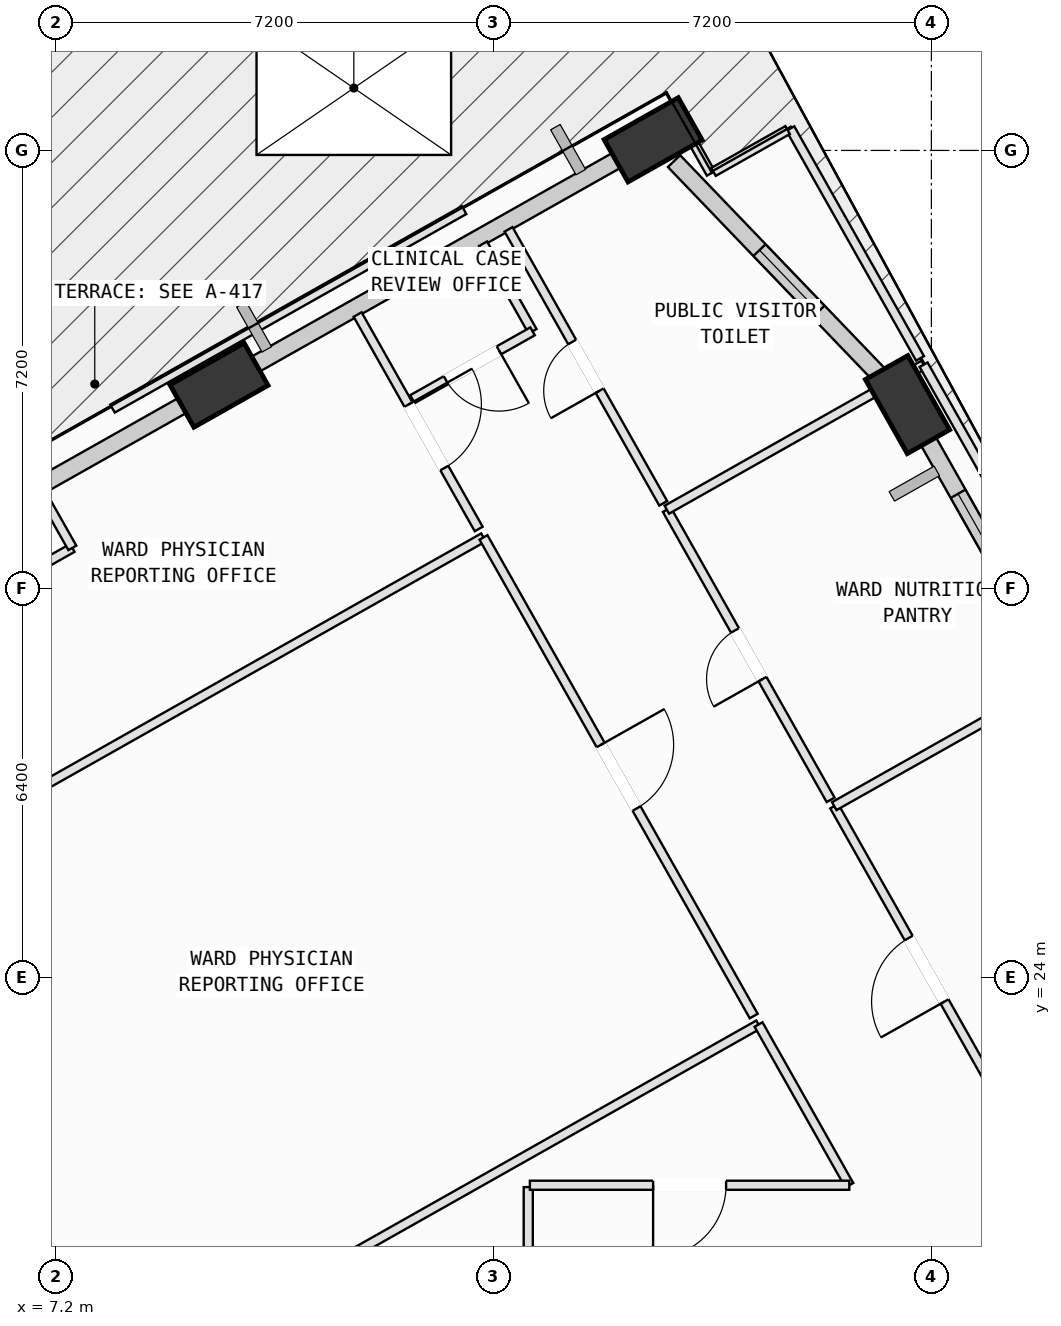
"""IFC4 building model, lengths in metres.
Left out: names, types, materials, properties, quantities, classifications, styles, units other than length and angle.
Written with IfcOpenShell. Run it as: python <this file> out.ifc"""

import sys

from ifc_helpers import new_model, si_unit, direction, frame, frame_2d, origin, origin_2d, place, context, subcontext, project, spatial, rectangle, extrude, element, fill, save


model = new_model("IFC4")
c1 = context("Model", 3, precision=1e-05, world=origin(), true_north=direction((0.0, 1.0)))
c2 = subcontext(c1, "Body", "Model", "MODEL_VIEW")
j1 = project(units=[si_unit("LENGTHUNIT", "METRE"), si_unit("PLANEANGLEUNIT", "RADIAN")], contexts=[c1])
p1 = place(None, origin())
s1 = spatial("IfcSite", under=j1, at=p1, CompositionType="ELEMENT")
p2 = place(p1, origin())
s2 = spatial("IfcBuilding", under=s1, at=p2, CompositionType="ELEMENT")
p3 = place(p2, frame((0.0, 0.0, 149.8)))
s3 = spatial("IfcBuildingStorey", under=s2, at=p3, CompositionType="ELEMENT", Elevation=149.8)
p4 = place(p3, frame((21.208, 33.419, 0.053), z_axis=(-0.035203563334, -0.051508371615, 0.998051900846), x_axis=(0.084473299342, 0.994943607494, 0.054327521614)))
e1 = element("IfcColumn", 1, at=p4, inside=s3, PredefinedType="COLUMN", context=c2, shape_type="SweptSolid", body=[
    extrude(rectangle(XDim=1.4, YDim=0.8, at=origin_2d()), origin(), (0.0, 0.0, 1.0), 3.953),
])
p5 = place(p3, frame((17.024, 37.775, 0.063), z_axis=(-0.053027503477, -0.068911033073, 0.996212504135), x_axis=(0.988817744934, -0.14286989529, 0.04275114411)))
e2 = element("IfcColumn", 2, at=p5, inside=s3, PredefinedType="COLUMN", context=c2, shape_type="SweptSolid", body=[
    extrude(rectangle(XDim=1.4, YDim=0.8, at=origin_2d()), origin(), (0.0, 0.0, 1.0), 3.95),
])
p6 = place(p3, frame((9.884, 33.74, 0.075), z_axis=(-0.036080308129, -0.098029516425, 0.994529248074), x_axis=(0.986085311724, 0.15810776909, 0.051358459426)))
e3 = element("IfcColumn", 3, at=p6, inside=s3, PredefinedType="COLUMN", context=c2, shape_type="SweptSolid", body=[
    extrude(rectangle(XDim=1.4, YDim=0.8, at=origin_2d()), origin(), (0.0, 0.0, 1.0), 3.945),
])
p7 = place(p3, frame((24.534, 27.535, 0.0), z_axis=(0.0, 0.0, 1.0), x_axis=(-0.491640915593, 0.870798030611, 0.0)))
e4 = element("IfcWall", 4, at=p7, inside=s3, PredefinedType="SOLIDWALL", context=c2, shape_type="SweptSolid", body=[
    extrude(rectangle(XDim=6.223, YDim=0.28, at=frame_2d((3.111, 0.0))), origin(), (0.0, 0.0, 1.0), 3.165),
])
p8 = place(p7, frame((3.074, 0.0, 0.75)))
e5 = element("IfcOpeningElement", 5, at=p8, cuts=e4, PredefinedType="OPENING", context=c2, shape_type="SweptSolid", body=[
    extrude(rectangle(XDim=2.0, YDim=1.95, at=frame_2d((1.0, 0.975))), frame((0.0, 0.15, 0.0), z_axis=(0.0, -1.0, 0.0), x_axis=(1.0, 0.0, 0.0)), (0.0, 0.0, 1.0), 0.3),
])
p9 = place(p3, frame((17.368, 37.425, 0.0), z_axis=(0.0, 0.0, 1.0), x_axis=(0.692504883459, -0.721413187005, 0.0)))
e6 = element("IfcWall", 6, at=p9, inside=s3, PredefinedType="SOLIDWALL", context=c2, shape_type="SweptSolid", body=[
    extrude(rectangle(XDim=5.093, YDim=0.28, at=frame_2d((2.546, 0.0))), origin(), (0.0, 0.0, 1.0), 3.165),
])
p10 = place(p9, frame((2.03, 0.0, 0.75)))
e7 = element("IfcOpeningElement", 7, at=p10, cuts=e6, PredefinedType="OPENING", context=c2, shape_type="SweptSolid", body=[
    extrude(rectangle(XDim=1.4, YDim=1.85, at=frame_2d((0.7, 0.925))), frame((0.0, 0.15, 0.0), z_axis=(0.0, -1.0, 0.0), x_axis=(1.0, 0.0, 0.0)), (0.0, 0.0, 1.0), 0.3),
])
p11 = place(p3, frame((10.163, 33.903, 0.0), z_axis=(0.0, 0.0, 1.0), x_axis=(0.87077907775, 0.491674483528, 0.0)))
e8 = element("IfcWall", 8, at=p11, inside=s3, PredefinedType="SOLIDWALL", context=c2, shape_type="SweptSolid", body=[
    extrude(rectangle(XDim=7.231, YDim=0.28, at=frame_2d((3.615, 0.0))), origin(), (0.0, 0.0, 1.0), 3.165),
])
p12 = place(p3, frame((3.001, 29.86, 0.0), z_axis=(0.0, 0.0, 1.0), x_axis=(0.87078604554, 0.491662143033, 0.0)))
e9 = element("IfcWall", 9, at=p12, inside=s3, PredefinedType="SOLIDWALL", context=c2, shape_type="SweptSolid", body=[
    extrude(rectangle(XDim=7.27, YDim=0.28, at=frame_2d((3.635, 0.0))), origin(), (0.0, 0.0, 1.0), 3.165),
])
p13 = place(p12, frame((3.085, 0.0, 0.0)))
e10 = element("IfcOpeningElement", 10, at=p13, cuts=e9, PredefinedType="OPENING", context=c2, shape_type="SweptSolid", body=[
    extrude(rectangle(XDim=1.1, YDim=2.15, at=frame_2d((0.55, 1.075))), frame((0.0, 0.15, 0.0), z_axis=(0.0, -1.0, 0.0), x_axis=(1.0, 0.0, 0.0)), (0.0, 0.0, 1.0), 0.3),
])
p14 = place(p3, frame((14.97, 20.55, 0.0), z_axis=(0.0, 0.0, 1.0), x_axis=(0.0, -1.0, 0.0)))
e11 = element("IfcWall", 11, at=p14, inside=s3, PredefinedType="PARTITIONING", context=c2, shape_type="SweptSolid", body=[
    extrude(rectangle(XDim=2.32, YDim=0.15, at=frame_2d((1.16, 0.0))), origin(), (0.0, 0.0, 1.0), 2.765),
])
p15 = place(p3, frame((6.884, 16.519, 0.0), z_axis=(0.0, 0.0, 1.0), x_axis=(0.870744187076, 0.491736271464, 0.0)))
e12 = element("IfcWall", 12, at=p15, inside=s3, PredefinedType="PARTITIONING", context=c2, shape_type="SweptSolid", body=[
    extrude(rectangle(XDim=13.635, YDim=0.15, at=frame_2d((6.818, 0.0))), origin(), (0.0, 0.0, 1.0), 3.78),
])
p16 = place(p3, frame((18.757, 23.224, 0.0), z_axis=(0.0, 0.0, 1.0), x_axis=(0.491673041497, -0.870779891973, 0.0)))
e13 = element("IfcWall", 13, at=p16, inside=s3, PredefinedType="PARTITIONING", context=c2, shape_type="SweptSolid", body=[
    extrude(rectangle(XDim=3.036, YDim=0.15, at=frame_2d((1.518, 0.0))), origin(), (0.0, 0.0, 1.0), 3.78),
])
p17 = place(p3, frame((20.25, 20.58, 0.0), z_axis=(0.0, 0.0, 1.0), x_axis=(-1.0, 0.0, 0.0)))
e14 = element("IfcWall", 14, at=p17, inside=s3, PredefinedType="PARTITIONING", context=c2, shape_type="SweptSolid", body=[
    extrude(rectangle(XDim=5.253, YDim=0.15, at=frame_2d((2.626, 0.0))), origin(), (0.0, 0.0, 1.0), 3.78),
])
p18 = place(p17, frame((2.027, 0.0, 0.0)))
e15 = element("IfcOpeningElement", 15, at=p18, cuts=e14, PredefinedType="OPENING", context=c2, shape_type="SweptSolid", body=[
    extrude(rectangle(XDim=1.2, YDim=2.15, at=frame_2d((0.6, 1.075))), frame((0.0, 0.085, 0.0), z_axis=(0.0, -1.0, 0.0), x_axis=(1.0, 0.0, 0.0)), (0.0, 0.0, 1.0), 0.17),
])
p19 = place(p3, frame((2.06, 24.361, 0.0), z_axis=(0.0, 0.0, 1.0), x_axis=(0.870772215096, 0.491686637419, 0.0)))
e16 = element("IfcWall", 16, at=p19, inside=s3, PredefinedType="PARTITIONING", context=c2, shape_type="SweptSolid", body=[
    extrude(rectangle(XDim=13.98, YDim=0.15, at=frame_2d((6.99, 0.0))), origin(), (0.0, 0.0, 1.0), 3.78),
])
p20 = place(p3, frame((14.234, 31.235, 0.0), z_axis=(0.0, 0.0, 1.0), x_axis=(0.491609563099, -0.870815731065, 0.0)))
e17 = element("IfcWall", 17, at=p20, inside=s3, PredefinedType="PARTITIONING", context=c2, shape_type="SweptSolid", body=[
    extrude(rectangle(XDim=9.04, YDim=0.15, at=frame_2d((4.52, 0.0))), origin(), (0.0, 0.0, 1.0), 3.78),
])
p21 = place(p20, frame((3.92, 0.0, 0.0)))
e18 = element("IfcOpeningElement", 18, at=p21, cuts=e17, PredefinedType="OPENING", context=c2, shape_type="SweptSolid", body=[
    extrude(rectangle(XDim=1.2, YDim=2.15, at=frame_2d((0.6, 1.075))), frame((0.0, 0.085, 0.0), z_axis=(0.0, -1.0, 0.0), x_axis=(1.0, 0.0, 0.0)), (0.0, 0.0, 1.0), 0.17),
])
p22 = place(p3, frame((5.992, 30.227, 0.0), z_axis=(0.0, 0.0, 1.0), x_axis=(0.870707257982, 0.491801658088, 0.0)))
e19 = element("IfcWall", 19, at=p22, inside=s3, PredefinedType="PARTITIONING", context=c2, shape_type="SweptSolid", body=[
    extrude(rectangle(XDim=1.7, YDim=0.15, at=frame_2d((0.85, 0.0))), origin(), (0.0, 0.0, 1.0), 3.78),
])
p23 = place(p3, frame((7.472, 31.063, 0.0), z_axis=(0.0, 0.0, 1.0), x_axis=(-0.491839596701, 0.870685828021, 0.0)))
e20 = element("IfcWall", 20, at=p23, inside=s3, PredefinedType="PARTITIONING", context=c2, shape_type="SweptSolid", body=[
    extrude(rectangle(XDim=1.035, YDim=0.15, at=frame_2d((0.518, 0.0))), origin(), (0.0, 0.0, 1.0), 3.78),
])
p24 = place(p3, frame((9.248, 33.582, 0.0), z_axis=(0.0, 0.0, 1.0), x_axis=(0.870891428994, 0.491475450969, 0.0)))
e21 = element("IfcWall", 21, at=p24, inside=s3, PredefinedType="PARTITIONING", context=c2, shape_type="SweptSolid", body=[
    extrude(rectangle(XDim=0.954, YDim=0.15, at=frame_2d((0.477, 0.0))), origin(), (0.0, 0.0, 1.0), 3.78),
])
p25 = place(p3, frame((12.164, 34.901, 0.0), z_axis=(0.0, 0.0, 1.0), x_axis=(0.491594368038, -0.870824309096, 0.0)))
e22 = element("IfcWall", 22, at=p25, inside=s3, PredefinedType="PARTITIONING", context=c2, shape_type="SweptSolid", body=[
    extrude(rectangle(XDim=4.05, YDim=0.15, at=frame_2d((2.025, 0.0))), origin(), (0.0, 0.0, 1.0), 3.78),
])
p26 = place(p25, frame((1.7, 0.0, 0.0)))
e23 = element("IfcOpeningElement", 23, at=p26, cuts=e22, PredefinedType="OPENING", context=c2, shape_type="SweptSolid", body=[
    extrude(rectangle(XDim=1.2, YDim=2.15, at=frame_2d((0.6, 1.075))), frame((0.0, 0.085, 0.0), z_axis=(0.0, -1.0, 0.0), x_axis=(1.0, 0.0, 0.0)), (0.0, 0.0, 1.0), 0.17),
])
p27 = place(p3, frame((23.041, 21.433, 0.0), z_axis=(0.0, 0.0, 1.0), x_axis=(-0.49170838603, 0.870759934258, 0.0)))
e24 = element("IfcWall", 24, at=p27, inside=s3, PredefinedType="PARTITIONING", context=c2, shape_type="SweptSolid", body=[
    extrude(rectangle(XDim=6.181, YDim=0.15, at=frame_2d((3.09, 0.0))), origin(), (0.0, 0.0, 1.0), 3.78),
])
p28 = place(p27, frame((2.49, 0.0, 0.0)))
e25 = element("IfcOpeningElement", 25, at=p28, cuts=e24, PredefinedType="OPENING", context=c2, shape_type="SweptSolid", body=[
    extrude(rectangle(XDim=1.2, YDim=2.15, at=frame_2d((0.6, 1.075))), frame((0.0, 0.085, 0.0), z_axis=(0.0, -1.0, 0.0), x_axis=(1.0, 0.0, 0.0)), (0.0, 0.0, 1.0), 0.17),
])
p29 = place(p3, frame((20.002, 26.815, 0.0), z_axis=(0.0, 0.0, 1.0), x_axis=(0.870879884138, 0.49149590782, 0.0)))
e26 = element("IfcWall", 26, at=p29, inside=s3, PredefinedType="PARTITIONING", context=c2, shape_type="SweptSolid", body=[
    extrude(rectangle(XDim=4.186, YDim=0.15, at=frame_2d((2.093, 0.0))), origin(), (0.0, 0.0, 1.0), 3.78),
])
p30 = place(p3, frame((19.943, 26.919, 0.0), z_axis=(0.0, 0.0, 1.0), x_axis=(-0.491627062899, 0.870805851511, 0.0)))
e27 = element("IfcWall", 27, at=p30, inside=s3, PredefinedType="PARTITIONING", context=c2, shape_type="SweptSolid", body=[
    extrude(rectangle(XDim=5.48, YDim=0.15, at=frame_2d((2.74, 0.0))), origin(), (0.0, 0.0, 1.0), 3.78),
])
p31 = place(p30, frame((2.28, 0.0, 0.0)))
e28 = element("IfcOpeningElement", 28, at=p31, cuts=e27, PredefinedType="OPENING", context=c2, shape_type="SweptSolid", body=[
    extrude(rectangle(XDim=0.92, YDim=2.1, at=frame_2d((0.46, 1.05))), frame((0.0, 0.085, 0.0), z_axis=(0.0, -1.0, 0.0), x_axis=(1.0, 0.0, 0.0)), (0.0, 0.0, 1.0), 0.17),
])
p32 = place(p3, frame((17.249, 31.691, 0.0), z_axis=(0.0, 0.0, 1.0), x_axis=(0.870728177917, 0.491764618675, 0.0)))
e29 = element("IfcWall", 29, at=p32, inside=s3, PredefinedType="PARTITIONING", context=c2, shape_type="SweptSolid", body=[
    extrude(rectangle(XDim=4.069, YDim=0.15, at=frame_2d((2.035, 0.0))), origin(), (0.0, 0.0, 1.0), 3.78),
])
p33 = place(p3, frame((20.995, 33.806, 0.0), z_axis=(0.0, 0.0, 1.0), x_axis=(0.870155930742, 0.492776476908, 0.0)))
e30 = element("IfcWall", 30, at=p33, inside=s3, PredefinedType="PARTITIONING", context=c2, shape_type="SweptSolid", body=[
    extrude(rectangle(XDim=0.548, YDim=0.15, at=frame_2d((0.274, 0.0))), origin(), (0.0, 0.0, 1.0), 3.78),
])
p34 = place(p3, frame((21.472, 34.076, 0.0), z_axis=(0.0, 0.0, 1.0), x_axis=(0.491762179601, -0.870729555438, 0.0)))
e31 = element("IfcWall", 31, at=p34, inside=s3, PredefinedType="PARTITIONING", context=c2, shape_type="SweptSolid", body=[
    extrude(rectangle(XDim=5.48, YDim=0.15, at=frame_2d((2.74, 0.0))), origin(), (0.0, 0.0, 1.0), 3.78),
])
p35 = place(p3, frame((19.28, 37.96, 0.0), z_axis=(0.0, 0.0, 1.0), x_axis=(0.491449194126, -0.870906246155, 0.0)))
e32 = element("IfcWall", 32, at=p35, inside=s3, PredefinedType="PARTITIONING", context=c2, shape_type="SweptSolid", body=[
    extrude(rectangle(XDim=4.34, YDim=0.15, at=frame_2d((2.17, 0.0))), origin(), (0.0, 0.0, 1.0), 3.78),
])
p36 = place(p3, frame((17.19, 31.796, 0.0), z_axis=(0.0, 0.0, 1.0), x_axis=(-0.49162033615, 0.870809649168, 0.0)))
e33 = element("IfcWall", 33, at=p36, inside=s3, PredefinedType="PARTITIONING", context=c2, shape_type="SweptSolid", body=[
    extrude(rectangle(XDim=5.175, YDim=0.15, at=frame_2d((2.587, 0.0))), origin(), (0.0, 0.0, 1.0), 3.78),
])
p37 = place(p36, frame((2.127, 0.0, 0.0)))
e34 = element("IfcOpeningElement", 34, at=p37, cuts=e33, PredefinedType="OPENING", context=c2, shape_type="SweptSolid", body=[
    extrude(rectangle(XDim=0.92, YDim=2.1, at=frame_2d((0.46, 1.05))), frame((0.0, 0.085, 0.0), z_axis=(0.0, -1.0, 0.0), x_axis=(1.0, 0.0, 0.0)), (0.0, 0.0, 1.0), 0.17),
])
p38 = place(p3, frame((16.366, 37.624, 0.0), z_axis=(0.0, 0.0, 1.0), x_axis=(0.870842533714, 0.491562083031, 0.0)))
e35 = element("IfcWall", 35, at=p38, inside=s3, PredefinedType="PARTITIONING", context=c2, shape_type="SweptSolid", body=[
    extrude(rectangle(XDim=1.202, YDim=0.15, at=frame_2d((0.601, 0.0))), origin(), (0.0, 0.0, 1.0), 3.165),
])
p39 = place(p3, frame((17.438, 38.171, 0.0), z_axis=(0.0, 0.0, 1.0), x_axis=(0.491037802501, -0.871138264867, 0.0)))
e36 = element("IfcWall", 36, at=p39, inside=s3, PredefinedType="PARTITIONING", context=c2, shape_type="SweptSolid", body=[
    extrude(rectangle(XDim=1.089, YDim=0.15, at=frame_2d((0.545, 0.0))), origin(), (0.0, 0.0, 1.0), 3.78),
])
p40 = place(p3, frame((18.017, 37.247, 0.0), z_axis=(0.0, 0.0, 1.0), x_axis=(0.870871273197, 0.491511165205, 0.0)))
e37 = element("IfcWall", 37, at=p40, inside=s3, PredefinedType="PARTITIONING", context=c2, shape_type="SweptSolid", body=[
    extrude(rectangle(XDim=1.4, YDim=0.15, at=frame_2d((0.7, 0.0))), origin(), (0.0, 0.0, 1.0), 3.78),
])
p41 = place(p3, frame((8.133, 33.354, 0.0), z_axis=(0.0, 0.0, 1.0), x_axis=(0.870768198127, 0.491693751364, 0.0)))
e38 = element("IfcWall", 38, at=p41, inside=s3, PredefinedType="PARTITIONING", context=c2, shape_type="SweptSolid", body=[
    extrude(rectangle(XDim=6.64, YDim=0.15, at=frame_2d((3.32, 0.0))), origin(), (0.0, 0.0, 1.0), 3.78),
])
p42 = place(p3, frame((14.227, 36.066, 0.0), z_axis=(0.0, 0.0, 1.0), x_axis=(0.491843353875, -0.87068370563, 0.0)))
e39 = element("IfcWall", 39, at=p42, inside=s3, PredefinedType="PARTITIONING", context=c2, shape_type="SweptSolid", body=[
    extrude(rectangle(XDim=1.655, YDim=0.15, at=frame_2d((0.828, 0.0))), origin(), (0.0, 0.0, 1.0), 3.78),
])
p43 = place(p3, frame((15.041, 34.625, 0.0), z_axis=(0.0, 0.0, 1.0), x_axis=(-0.870741103083, -0.491741732418, 0.0)))
e40 = element("IfcWall", 40, at=p43, inside=s3, PredefinedType="PARTITIONING", context=c2, shape_type="SweptSolid", body=[
    extrude(rectangle(XDim=2.27, YDim=0.15, at=frame_2d((1.135, 0.0))), origin(), (0.0, 0.0, 1.0), 3.78),
])
p44 = place(p43, frame((0.635, 0.0, 0.0)))
e41 = element("IfcOpeningElement", 41, at=p44, cuts=e40, PredefinedType="OPENING", context=c2, shape_type="SweptSolid", body=[
    extrude(rectangle(XDim=1.0, YDim=2.12, at=frame_2d((0.5, 1.06))), frame((0.0, 0.085, 0.0), z_axis=(0.0, -1.0, 0.0), x_axis=(1.0, 0.0, 0.0)), (0.0, 0.0, 1.0), 0.17),
])
p45 = place(p3, frame((0.0, 0.0, -0.24)))
p46 = place(p45, frame((12.101, 38.626, 0.0)))
p47 = place(p46, frame((0.0, 0.0, 0.2)))
e42 = element("IfcWindow", 42, at=p47, inside=s3, PartitioningType="SINGLE_PANEL", PredefinedType="SKYLIGHT", context=c2, shape_type="SweptSolid", body=[
    extrude(rectangle(XDim=3.2, YDim=2.2, at=origin_2d()), origin(), (0.0, 0.0, 1.0), 0.04),
])
p48 = place(p8, origin())
e43 = element("IfcWindow", 43, at=p48, inside=s3, PartitioningType="SINGLE_PANEL", PredefinedType="WINDOW", context=c2, shape_type="SweptSolid", body=[
    extrude(rectangle(XDim=2.0, YDim=1.95, at=frame_2d((1.0, 0.975))), frame((0.0, 0.03, 0.0), z_axis=(0.0, -1.0, 0.0), x_axis=(1.0, 0.0, 0.0)), (0.0, 0.0, 1.0), 0.06),
])
fill(e5, e43)
p49 = place(p10, origin())
e44 = element("IfcWindow", 44, at=p49, inside=s3, PartitioningType="SINGLE_PANEL", PredefinedType="WINDOW", context=c2, shape_type="SweptSolid", body=[
    extrude(rectangle(XDim=1.4, YDim=1.85, at=frame_2d((0.7, 0.925))), frame((0.0, 0.03, 0.0), z_axis=(0.0, -1.0, 0.0), x_axis=(1.0, 0.0, 0.0)), (0.0, 0.0, 1.0), 0.06),
])
fill(e7, e44)
p50 = place(p18, origin())
e45 = element("IfcDoor", 45, at=p50, inside=s3, OperationType="SINGLE_SWING_RIGHT", PredefinedType="DOOR", context=c2, shape_type="SweptSolid", body=[
    extrude(rectangle(XDim=1.2, YDim=2.15, at=frame_2d((0.6, 1.075))), frame((0.0, 0.025, 0.0), z_axis=(0.0, -1.0, 0.0), x_axis=(1.0, 0.0, 0.0)), (0.0, 0.0, 1.0), 0.05),
])
fill(e15, e45)
p51 = place(p21, origin())
e46 = element("IfcDoor", 46, at=p51, inside=s3, OperationType="SINGLE_SWING_LEFT", PredefinedType="DOOR", context=c2, shape_type="SweptSolid", body=[
    extrude(rectangle(XDim=1.2, YDim=2.15, at=frame_2d((0.6, 1.075))), frame((0.0, 0.025, 0.0), z_axis=(0.0, -1.0, 0.0), x_axis=(1.0, 0.0, 0.0)), (0.0, 0.0, 1.0), 0.05),
])
fill(e18, e46)
p52 = place(p26, origin())
e47 = element("IfcDoor", 47, at=p52, inside=s3, OperationType="SINGLE_SWING_LEFT", PredefinedType="DOOR", context=c2, shape_type="SweptSolid", body=[
    extrude(rectangle(XDim=1.2, YDim=2.15, at=frame_2d((0.6, 1.075))), frame((0.0, 0.025, 0.0), z_axis=(0.0, -1.0, 0.0), x_axis=(1.0, 0.0, 0.0)), (0.0, 0.0, 1.0), 0.05),
])
fill(e23, e47)
p53 = place(p28, origin())
e48 = element("IfcDoor", 48, at=p53, inside=s3, OperationType="SINGLE_SWING_LEFT", PredefinedType="DOOR", context=c2, shape_type="SweptSolid", body=[
    extrude(rectangle(XDim=1.2, YDim=2.15, at=frame_2d((0.6, 1.075))), frame((0.0, 0.025, 0.0), z_axis=(0.0, -1.0, 0.0), x_axis=(1.0, 0.0, 0.0)), (0.0, 0.0, 1.0), 0.05),
])
fill(e25, e48)
p54 = place(p31, origin())
e49 = element("IfcDoor", 49, at=p54, inside=s3, OperationType="SINGLE_SWING_LEFT", PredefinedType="DOOR", context=c2, shape_type="SweptSolid", body=[
    extrude(rectangle(XDim=0.92, YDim=2.1, at=frame_2d((0.46, 1.05))), frame((0.0, 0.025, 0.0), z_axis=(0.0, -1.0, 0.0), x_axis=(1.0, 0.0, 0.0)), (0.0, 0.0, 1.0), 0.05),
])
fill(e28, e49)
p55 = place(p37, origin())
e50 = element("IfcDoor", 50, at=p55, inside=s3, OperationType="SINGLE_SWING_LEFT", PredefinedType="DOOR", context=c2, shape_type="SweptSolid", body=[
    extrude(rectangle(XDim=0.92, YDim=2.1, at=frame_2d((0.46, 1.05))), frame((0.0, 0.025, 0.0), z_axis=(0.0, -1.0, 0.0), x_axis=(1.0, 0.0, 0.0)), (0.0, 0.0, 1.0), 0.05),
])
fill(e34, e50)
p56 = place(p44, origin())
e51 = element("IfcDoor", 51, at=p56, inside=s3, OperationType="SINGLE_SWING_LEFT", PredefinedType="DOOR", context=c2, shape_type="SweptSolid", body=[
    extrude(rectangle(XDim=1.0, YDim=2.12, at=frame_2d((0.5, 1.06))), frame((0.0, 0.025, 0.0), z_axis=(0.0, -1.0, 0.0), x_axis=(1.0, 0.0, 0.0)), (0.0, 0.0, 1.0), 0.05),
])
fill(e41, e51)
save(model, sys.argv[1])
